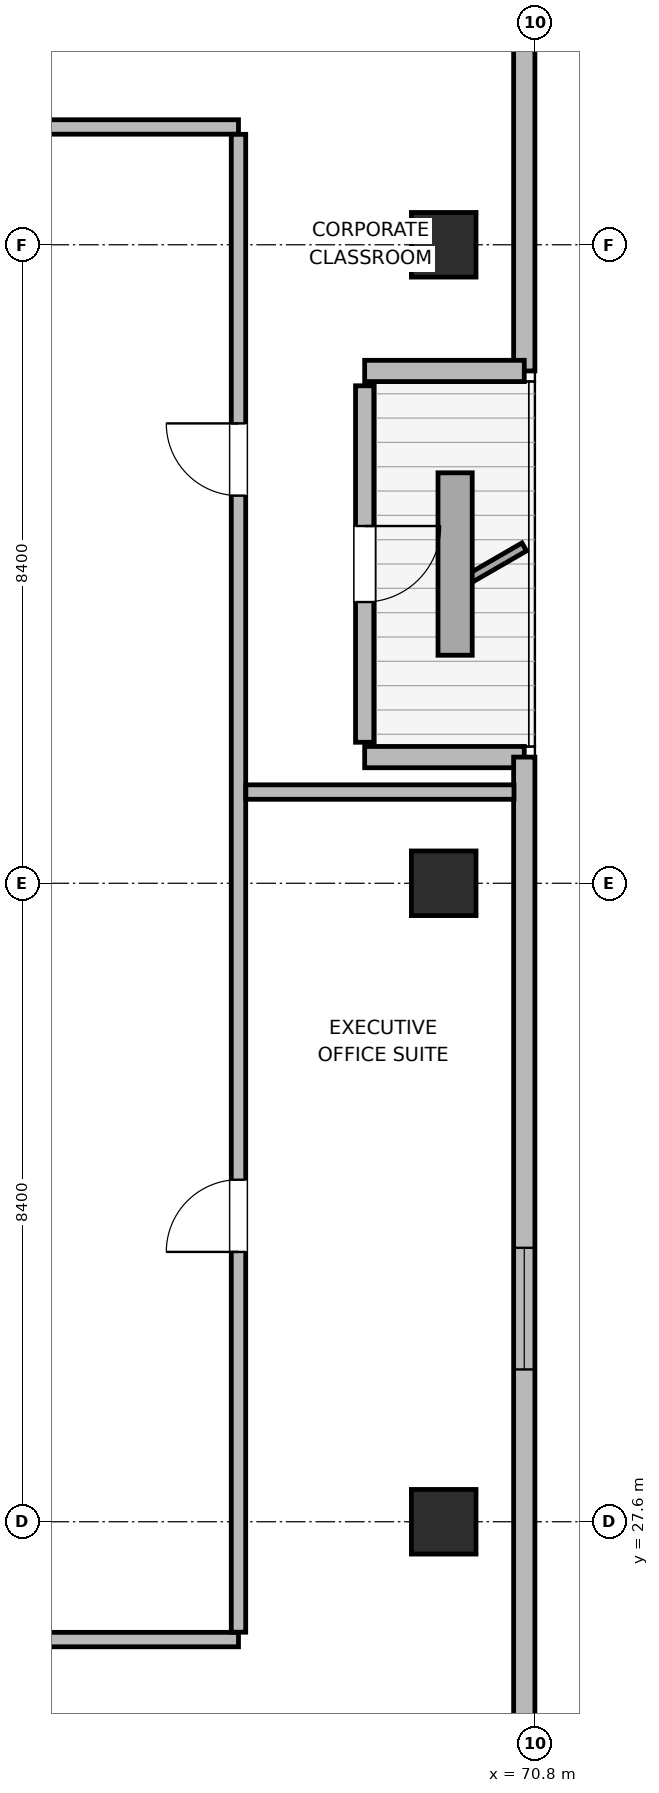
"""IFC4 building model, lengths in metres.
Left out: names, types, materials, properties, quantities, classifications, styles, units other than length and angle.
Written with IfcOpenShell. Run it as: python <this file> out.ifc"""

import sys

from ifc_helpers import new_model, si_unit, direction, frame, frame_2d, origin, origin_2d, place, context, subcontext, project, spatial, rectangle, extrude, element, fill, save


model = new_model("IFC4")
c1 = context("Model", 3, precision=1e-05, world=origin(), true_north=direction((0.0, 1.0)))
c2 = subcontext(c1, "Body", "Model", "MODEL_VIEW")
j1 = project(units=[si_unit("LENGTHUNIT", "METRE"), si_unit("PLANEANGLEUNIT", "RADIAN")], contexts=[c1])
p1 = place(None, origin())
s1 = spatial("IfcSite", under=j1, at=p1, CompositionType="ELEMENT")
p2 = place(p1, origin())
s2 = spatial("IfcBuilding", under=s1, at=p2, CompositionType="ELEMENT")
p3 = place(p2, frame((0.0, 0.0, 325.8)))
s3 = spatial("IfcBuildingStorey", under=s2, at=p3, CompositionType="ELEMENT", Elevation=325.8)
for number, where, z_axis, x_axis in (
    (1, (69.6, 27.6, 0.0), (0.0, 0.0, 1.0), (1.0, 0.0, 0.0)),
    (2, (69.6, 36.0, 0.0), (0.0, 0.0, 1.0), (1.0, 0.0, 0.0)),
    (3, (69.6, 44.4, 0.0), (0.0, 0.0, 1.0), (1.0, 0.0, 0.0)),
):
    element("IfcColumn", number, at=place(p3, frame(where, z_axis=z_axis, x_axis=x_axis)), inside=s3, PredefinedType="COLUMN", context=c2, shape_type="SweptSolid", body=[
        extrude(rectangle(XDim=0.85, YDim=0.85, at=origin_2d()), origin(), (0.0, 0.0, 1.0), 3.9),
    ])
p4 = place(p3, frame((70.66, 48.582, 0.0), z_axis=(0.0, 0.0, 1.0), x_axis=(0.0, -1.0, 0.0)))
e4 = element("IfcWall", 4, at=p4, inside=s3, PredefinedType="SOLIDWALL", context=c2, shape_type="SweptSolid", body=[
    extrude(rectangle(XDim=5.842, YDim=0.28, at=frame_2d((2.921, 0.0))), origin(), (0.0, 0.0, 1.0), 3.68),
])
p5 = place(p3, frame((70.66, 42.74, 0.0), z_axis=(0.0, 0.0, 1.0), x_axis=(-1.0, 0.0, 0.0)))
e5 = element("IfcWall", 5, at=p5, inside=s3, PredefinedType="SOLIDWALL", context=c2, shape_type="SweptSolid", body=[
    extrude(rectangle(XDim=2.1, YDim=0.28, at=frame_2d((1.05, 0.0))), origin(), (0.0, 0.0, 1.0), 3.126),
])
p6 = place(p3, frame((68.56, 42.545, 0.0), z_axis=(0.0, 0.0, 1.0), x_axis=(0.0, -1.0, 0.0)))
e6 = element("IfcWall", 6, at=p6, inside=s3, PredefinedType="SOLIDWALL", context=c2, shape_type="SweptSolid", body=[
    extrude(rectangle(XDim=4.69, YDim=0.24, at=frame_2d((2.345, 0.0))), origin(), (0.0, 0.0, 1.0), 3.311),
])
p7 = place(p6, frame((1.845, 0.0, 0.0)))
e7 = element("IfcOpeningElement", 7, at=p7, cuts=e6, PredefinedType="OPENING", context=c2, shape_type="SweptSolid", body=[
    extrude(rectangle(XDim=1.0, YDim=2.02, at=frame_2d((0.5, 1.01))), frame((0.0, 0.13, 0.0), z_axis=(0.0, -1.0, 0.0), x_axis=(1.0, 0.0, 0.0)), (0.0, 0.0, 1.0), 0.26),
])
p8 = place(p3, frame((68.56, 37.66, 0.0), z_axis=(0.0, 0.0, 1.0), x_axis=(1.0, 0.0, 0.0)))
e8 = element("IfcWall", 8, at=p8, inside=s3, PredefinedType="SOLIDWALL", context=c2, shape_type="SweptSolid", body=[
    extrude(rectangle(XDim=2.1, YDim=0.28, at=frame_2d((1.05, 0.0))), origin(), (0.0, 0.0, 1.0), 3.126),
])
p9 = place(p3, frame((70.66, 37.66, 0.0), z_axis=(0.0, 0.0, 1.0), x_axis=(0.0, -1.0, 0.0)))
e9 = element("IfcWall", 9, at=p9, inside=s3, PredefinedType="SOLIDWALL", context=c2, shape_type="SweptSolid", body=[
    extrude(rectangle(XDim=14.241, YDim=0.28, at=frame_2d((7.121, 0.0))), origin(), (0.0, 0.0, 1.0), 3.68),
])
p10 = place(p9, frame((6.456, 0.0, 0.85)))
e10 = element("IfcOpeningElement", 10, at=p10, cuts=e9, PredefinedType="OPENING", context=c2, shape_type="SweptSolid", body=[
    extrude(rectangle(XDim=1.6, YDim=1.0, at=frame_2d((0.8, 0.5))), frame((0.0, 0.15, 0.0), z_axis=(0.0, -1.0, 0.0), x_axis=(1.0, 0.0, 0.0)), (0.0, 0.0, 1.0), 0.3),
])
p11 = place(p3, frame((30.6, 26.05, 0.0), z_axis=(0.0, 0.0, 1.0), x_axis=(1.0, 0.0, 0.0)))
e11 = element("IfcWall", 11, at=p11, inside=s3, PredefinedType="PLUMBINGWALL", context=c2, shape_type="SweptSolid", body=[
    extrude(rectangle(XDim=36.3, YDim=0.19, at=frame_2d((18.15, 0.0))), origin(), (0.0, 0.0, 1.0), 3.68),
])
p12 = place(p11, frame((2.975, 0.0, 0.0)))
e12 = element("IfcOpeningElement", 12, at=p12, cuts=e11, PredefinedType="OPENING", context=c2, shape_type="SweptSolid", body=[
    extrude(rectangle(XDim=1.8, YDim=2.06, at=frame_2d((0.9, 1.03))), frame((0.0, 0.105, 0.0), z_axis=(0.0, -1.0, 0.0), x_axis=(1.0, 0.0, 0.0)), (0.0, 0.0, 1.0), 0.21),
])
p13 = place(p11, frame((13.425, 0.0, 0.0)))
e13 = element("IfcOpeningElement", 13, at=p13, cuts=e11, PredefinedType="OPENING", context=c2, shape_type="SweptSolid", body=[
    extrude(rectangle(XDim=1.8, YDim=2.06, at=frame_2d((0.9, 1.03))), frame((0.0, 0.105, 0.0), z_axis=(0.0, -1.0, 0.0), x_axis=(1.0, 0.0, 0.0)), (0.0, 0.0, 1.0), 0.21),
])
p14 = place(p11, frame((28.125, 0.0, 0.0)))
e14 = element("IfcOpeningElement", 14, at=p14, cuts=e11, PredefinedType="OPENING", context=c2, shape_type="SweptSolid", body=[
    extrude(rectangle(XDim=1.8, YDim=2.06, at=frame_2d((0.9, 1.03))), frame((0.0, 0.105, 0.0), z_axis=(0.0, -1.0, 0.0), x_axis=(1.0, 0.0, 0.0)), (0.0, 0.0, 1.0), 0.21),
])
p15 = place(p3, frame((30.6, 45.95, 0.0), z_axis=(0.0, 0.0, 1.0), x_axis=(1.0, 0.0, 0.0)))
e15 = element("IfcWall", 15, at=p15, inside=s3, PredefinedType="PLUMBINGWALL", context=c2, shape_type="SweptSolid", body=[
    extrude(rectangle(XDim=36.3, YDim=0.19, at=frame_2d((18.15, 0.0))), origin(), (0.0, 0.0, 1.0), 3.68),
])
p16 = place(p15, frame((1.975, 0.0, 0.0)))
e16 = element("IfcOpeningElement", 16, at=p16, cuts=e15, PredefinedType="OPENING", context=c2, shape_type="SweptSolid", body=[
    extrude(rectangle(XDim=1.8, YDim=2.06, at=frame_2d((0.9, 1.03))), frame((0.0, 0.105, 0.0), z_axis=(0.0, -1.0, 0.0), x_axis=(1.0, 0.0, 0.0)), (0.0, 0.0, 1.0), 0.21),
])
p17 = place(p15, frame((9.925, 0.0, 0.0)))
e17 = element("IfcOpeningElement", 17, at=p17, cuts=e15, PredefinedType="OPENING", context=c2, shape_type="SweptSolid", body=[
    extrude(rectangle(XDim=1.8, YDim=2.06, at=frame_2d((0.9, 1.03))), frame((0.0, 0.105, 0.0), z_axis=(0.0, -1.0, 0.0), x_axis=(1.0, 0.0, 0.0)), (0.0, 0.0, 1.0), 0.21),
])
p18 = place(p15, frame((20.925, 0.0, 0.0)))
e18 = element("IfcOpeningElement", 18, at=p18, cuts=e15, PredefinedType="OPENING", context=c2, shape_type="SweptSolid", body=[
    extrude(rectangle(XDim=1.8, YDim=2.06, at=frame_2d((0.9, 1.03))), frame((0.0, 0.105, 0.0), z_axis=(0.0, -1.0, 0.0), x_axis=(1.0, 0.0, 0.0)), (0.0, 0.0, 1.0), 0.21),
])
p19 = place(p15, frame((31.125, 0.0, 0.0)))
e19 = element("IfcOpeningElement", 19, at=p19, cuts=e15, PredefinedType="OPENING", context=c2, shape_type="SweptSolid", body=[
    extrude(rectangle(XDim=1.8, YDim=2.06, at=frame_2d((0.9, 1.03))), frame((0.0, 0.105, 0.0), z_axis=(0.0, -1.0, 0.0), x_axis=(1.0, 0.0, 0.0)), (0.0, 0.0, 1.0), 0.21),
])
p20 = place(p3, frame((66.9, 26.147, 0.0), z_axis=(0.0, 0.0, 1.0), x_axis=(0.0, 1.0, 0.0)))
e20 = element("IfcWall", 20, at=p20, inside=s3, PredefinedType="PLUMBINGWALL", context=c2, shape_type="SweptSolid", body=[
    extrude(rectangle(XDim=19.706, YDim=0.19, at=frame_2d((9.853, 0.0))), origin(), (0.0, 0.0, 1.0), 3.68),
])
p21 = place(p20, frame((5.003, 0.0, 0.0)))
e21 = element("IfcOpeningElement", 21, at=p21, cuts=e20, PredefinedType="OPENING", context=c2, shape_type="SweptSolid", body=[
    extrude(rectangle(XDim=0.95, YDim=2.04, at=frame_2d((0.475, 1.02))), frame((0.0, 0.105, 0.0), z_axis=(0.0, -1.0, 0.0), x_axis=(1.0, 0.0, 0.0)), (0.0, 0.0, 1.0), 0.21),
])
p22 = place(p20, frame((14.953, 0.0, 0.0)))
e22 = element("IfcOpeningElement", 22, at=p22, cuts=e20, PredefinedType="OPENING", context=c2, shape_type="SweptSolid", body=[
    extrude(rectangle(XDim=0.95, YDim=2.04, at=frame_2d((0.475, 1.02))), frame((0.0, 0.105, 0.0), z_axis=(0.0, -1.0, 0.0), x_axis=(1.0, 0.0, 0.0)), (0.0, 0.0, 1.0), 0.21),
])
p23 = place(p3, frame((66.997, 37.2, 0.0), z_axis=(0.0, 0.0, 1.0), x_axis=(1.0, 0.0, 0.0)))
e23 = element("IfcWall", 23, at=p23, inside=s3, PredefinedType="PLUMBINGWALL", context=c2, shape_type="SweptSolid", body=[
    extrude(rectangle(XDim=3.528, YDim=0.19, at=frame_2d((1.764, 0.0))), origin(), (0.0, 0.0, 1.0), 3.68),
])
p24 = place(p7, origin())
e24 = element("IfcDoor", 24, at=p24, inside=s3, OperationType="SINGLE_SWING_LEFT", PredefinedType="DOOR", context=c2, shape_type="SweptSolid", body=[
    extrude(rectangle(XDim=1.0, YDim=2.02, at=frame_2d((0.5, 1.01))), frame((0.0, 0.025, 0.0), z_axis=(0.0, -1.0, 0.0), x_axis=(1.0, 0.0, 0.0)), (0.0, 0.0, 1.0), 0.05),
])
fill(e7, e24)
p25 = place(p10, origin())
e25 = element("IfcWindow", 25, at=p25, inside=s3, PartitioningType="SINGLE_PANEL", PredefinedType="WINDOW", context=c2, shape_type="SweptSolid", body=[
    extrude(rectangle(XDim=1.6, YDim=1.0, at=frame_2d((0.8, 0.5))), frame((0.0, 0.03, 0.0), z_axis=(0.0, -1.0, 0.0), x_axis=(1.0, 0.0, 0.0)), (0.0, 0.0, 1.0), 0.06),
])
fill(e10, e25)
p26 = place(p21, origin())
e26 = element("IfcDoor", 26, at=p26, inside=s3, OperationType="SINGLE_SWING_LEFT", PredefinedType="DOOR", context=c2, shape_type="SweptSolid", body=[
    extrude(rectangle(XDim=0.95, YDim=2.04, at=frame_2d((0.475, 1.02))), frame((0.0, 0.025, 0.0), z_axis=(0.0, -1.0, 0.0), x_axis=(1.0, 0.0, 0.0)), (0.0, 0.0, 1.0), 0.05),
])
fill(e21, e26)
p27 = place(p22, origin())
e27 = element("IfcDoor", 27, at=p27, inside=s3, OperationType="SINGLE_SWING_RIGHT", PredefinedType="DOOR", context=c2, shape_type="SweptSolid", body=[
    extrude(rectangle(XDim=0.95, YDim=2.04, at=frame_2d((0.475, 1.02))), frame((0.0, 0.025, 0.0), z_axis=(0.0, -1.0, 0.0), x_axis=(1.0, 0.0, 0.0)), (0.0, 0.0, 1.0), 0.05),
])
fill(e22, e27)
save(model, sys.argv[1])
